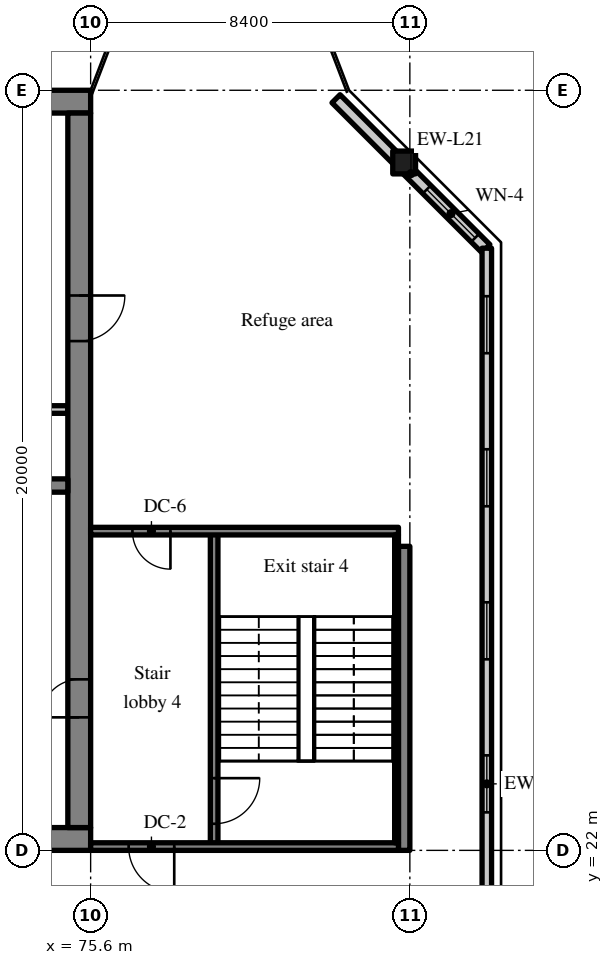
"""IFC4 building model, lengths in metres.
Left out: names, types, materials, properties, quantities, classifications, styles, units other than length and angle.
Written with IfcOpenShell. Run it as: python <this file> out.ifc"""

import sys

from ifc_helpers import new_model, si_unit, direction, frame, frame_2d, origin, origin_2d, place, context, subcontext, project, spatial, rectangle, extrude, source, transform, mapped, element, fill, save


model = new_model("IFC4")
c1 = context("Model", 3, precision=1e-05, world=origin(), true_north=direction((0.0, 1.0)))
c2 = subcontext(c1, "Body", "Model", "MODEL_VIEW")
j1 = project(units=[si_unit("LENGTHUNIT", "METRE"), si_unit("PLANEANGLEUNIT", "RADIAN")], contexts=[c1])
p1 = place(None, origin())
s1 = spatial("IfcSite", under=j1, at=p1, CompositionType="ELEMENT")
p2 = place(p1, origin())
s2 = spatial("IfcBuilding", under=s1, at=p2, CompositionType="ELEMENT")
p3 = place(p2, frame((0.0, 0.0, 237.4)))
s3 = spatial("IfcBuildingStorey", under=s2, at=p3, CompositionType="ELEMENT", Elevation=237.4)
m1 = source(origin(), c2, "Body", "SweptSolid", [
    extrude(rectangle(XDim=50.4, YDim=0.6, at=frame_2d((25.2, 0.0))), origin(), (0.0, 0.0, 1.0), 3.62),
])
p4 = place(p3, frame((25.2, 22.3, 0.0), z_axis=(0.0, 0.0, 1.0), x_axis=(1.0, 0.0, 0.0)))
e1 = element("IfcWall", 1, at=p4, inside=s3, PredefinedType="SHEAR", context=c2, shape_type="MappedRepresentation", body=[
    mapped(m1, transform((0.0, 0.0, 0.0), scale=1.0)),
])
m2 = source(origin(), c2, "Body", "SweptSolid", [
    extrude(rectangle(XDim=1.8, YDim=2.1, at=frame_2d((0.9, 1.05))), frame((0.0, 0.31, 0.0), z_axis=(0.0, -1.0, 0.0), x_axis=(1.0, 0.0, 0.0)), (0.0, 0.0, 1.0), 0.62),
])
p5 = place(p4, frame((15.9, 0.0, 0.0)))
e2 = element("IfcOpeningElement", 2, at=p5, cuts=e1, PredefinedType="OPENING", context=c2, shape_type="MappedRepresentation", body=[
    mapped(m2, transform((0.0, 0.0, 0.0), scale=1.0)),
])
m3 = source(origin(), c2, "Body", "SweptSolid", [
    extrude(rectangle(XDim=0.9, YDim=2.1, at=frame_2d((0.45, 1.05))), frame((0.0, 0.31, 0.0), z_axis=(0.0, -1.0, 0.0), x_axis=(1.0, 0.0, 0.0)), (0.0, 0.0, 1.0), 0.62),
])
p6 = place(p4, frame((9.687, 0.0, 0.0)))
e3 = element("IfcOpeningElement", 3, at=p6, cuts=e1, PredefinedType="OPENING", context=c2, shape_type="MappedRepresentation", body=[
    mapped(m3, transform((0.0, 0.0, 0.0), scale=1.0)),
])
p7 = place(p4, frame((21.513, 0.0, 0.0)))
e4 = element("IfcOpeningElement", 4, at=p7, cuts=e1, PredefinedType="OPENING", context=c2, shape_type="MappedRepresentation", body=[
    mapped(m3, transform((0.0, 0.0, 0.0), scale=1.0)),
])
p8 = place(p4, frame((32.7, 0.0, 0.0)))
e5 = element("IfcOpeningElement", 5, at=p8, cuts=e1, PredefinedType="OPENING", context=c2, shape_type="MappedRepresentation", body=[
    mapped(m2, transform((0.0, 0.0, 0.0), scale=1.0)),
])
m4 = source(origin(), c2, "Body", "SweptSolid", [
    extrude(rectangle(XDim=1.2, YDim=2.1, at=frame_2d((0.6, 1.05))), frame((0.0, 0.31, 0.0), z_axis=(0.0, -1.0, 0.0), x_axis=(1.0, 0.0, 0.0)), (0.0, 0.0, 1.0), 0.62),
])
p9 = place(p4, frame((6.488, 0.0, 0.0)))
e6 = element("IfcOpeningElement", 6, at=p9, cuts=e1, PredefinedType="OPENING", context=c2, shape_type="MappedRepresentation", body=[
    mapped(m4, transform((0.0, 0.0, 0.0), scale=1.0)),
])
p10 = place(p4, frame((47.925, 0.0, 0.0)))
e7 = element("IfcOpeningElement", 7, at=p10, cuts=e1, PredefinedType="OPENING", context=c2, shape_type="MappedRepresentation", body=[
    mapped(m4, transform((0.0, 0.0, 0.0), scale=1.0)),
])
p11 = place(p3, frame((25.2, 41.7, 0.0), z_axis=(0.0, 0.0, 1.0), x_axis=(1.0, 0.0, 0.0)))
e8 = element("IfcWall", 8, at=p11, inside=s3, PredefinedType="SHEAR", context=c2, shape_type="MappedRepresentation", body=[
    mapped(m1, transform((0.0, 0.0, 0.0), scale=1.0)),
])
m5 = source(origin(), c2, "Body", "SweptSolid", [
    extrude(rectangle(XDim=18.8, YDim=0.6, at=frame_2d((9.4, 0.0))), origin(), (0.0, 0.0, 1.0), 3.62),
])
p12 = place(p3, frame((75.3, 22.6, 0.0), z_axis=(0.0, 0.0, 1.0), x_axis=(0.0, 1.0, 0.0)))
e9 = element("IfcWall", 9, at=p12, inside=s3, PredefinedType="SHEAR", context=c2, shape_type="MappedRepresentation", body=[
    mapped(m5, transform((0.0, 0.0, 0.0), scale=1.0)),
])
m6 = source(origin(), c2, "Body", "SweptSolid", [
    extrude(rectangle(XDim=1.0, YDim=2.1, at=frame_2d((0.5, 1.05))), frame((0.0, 0.31, 0.0), z_axis=(0.0, -1.0, 0.0), x_axis=(1.0, 0.0, 0.0)), (0.0, 0.0, 1.0), 0.62),
])
p13 = place(p12, frame((2.9, 0.0, 0.0)))
e10 = element("IfcOpeningElement", 10, at=p13, cuts=e9, PredefinedType="OPENING", context=c2, shape_type="MappedRepresentation", body=[
    mapped(m6, transform((0.0, 0.0, 0.0), scale=1.0)),
])
p14 = place(p12, frame((12.8, 0.0, 0.0)))
e11 = element("IfcOpeningElement", 11, at=p14, cuts=e9, PredefinedType="OPENING", context=c2, shape_type="MappedRepresentation", body=[
    mapped(m4, transform((0.0, 0.0, 0.0), scale=1.0)),
])
m7 = source(origin(), c2, "Body", "SweptSolid", [
    extrude(rectangle(XDim=7.625, YDim=0.35, at=frame_2d((3.812, 0.0))), origin(), (0.0, 0.0, 1.0), 3.62),
])
p15 = place(p3, frame((67.375, 31.6, 0.0), z_axis=(0.0, 0.0, 1.0), x_axis=(1.0, 0.0, 0.0)))
e12 = element("IfcWall", 12, at=p15, inside=s3, PredefinedType="SHEAR", context=c2, shape_type="MappedRepresentation", body=[
    mapped(m7, transform((0.0, 0.0, 0.0), scale=1.0)),
])
m8 = source(origin(), c2, "Body", "SweptSolid", [
    extrude(rectangle(XDim=1.1, YDim=2.1, at=frame_2d((0.55, 1.05))), frame((0.0, 0.185, 0.0), z_axis=(0.0, -1.0, 0.0), x_axis=(1.0, 0.0, 0.0)), (0.0, 0.0, 1.0), 0.37),
])
p16 = place(p15, frame((5.8, 0.0, 0.0)))
e13 = element("IfcOpeningElement", 13, at=p16, cuts=e12, PredefinedType="OPENING", context=c2, shape_type="MappedRepresentation", body=[
    mapped(m8, transform((0.0, 0.0, 0.0), scale=1.0)),
])
m9 = source(origin(), c2, "Body", "SweptSolid", [
    extrude(rectangle(XDim=8.0, YDim=0.3, at=frame_2d((4.0, 0.0))), origin(), (0.0, 0.0, 1.0), 3.62),
])
p17 = place(p3, frame((83.85, 22.0, 0.0), z_axis=(0.0, 0.0, 1.0), x_axis=(0.0, 1.0, 0.0)))
e14 = element("IfcWall", 14, at=p17, inside=s3, PredefinedType="SHEAR", context=c2, shape_type="MappedRepresentation", body=[
    mapped(m9, transform((0.0, 0.0, 0.0), scale=1.0)),
])
m10 = source(origin(), c2, "Body", "SweptSolid", [
    extrude(rectangle(XDim=0.6, YDim=0.6, at=origin_2d()), origin(), (0.0, 0.0, 1.0), 3.62),
])
p18 = place(p3, frame((83.85, 40.1, 0.0), z_axis=(0.0, 0.0, 1.0), x_axis=(1.0, 0.0, 0.0)))
e15 = element("IfcColumn", 15, at=p18, inside=s3, PredefinedType="COLUMN", context=c2, shape_type="MappedRepresentation", body=[
    mapped(m10, transform((0.0, 0.0, 0.0), scale=1.0)),
])
m11 = source(origin(), c2, "Body", "SweptSolid", [
    extrude(rectangle(XDim=5.576, YDim=0.3, at=frame_2d((2.788, 0.0))), origin(), (0.0, 0.0, 1.0), 3.62),
])
p19 = place(p3, frame((86.0, 37.834, 0.0), z_axis=(0.0, 0.0, 1.0), x_axis=(-0.707106781187, 0.707106781187, 0.0)))
e16 = element("IfcWall", 16, at=p19, inside=s3, PredefinedType="SOLIDWALL", context=c2, shape_type="MappedRepresentation", body=[
    mapped(m11, transform((0.0, 0.0, 0.0), scale=1.0)),
])
m12 = source(origin(), c2, "Body", "SweptSolid", [
    extrude(rectangle(XDim=1.8, YDim=1.5, at=frame_2d((0.9, 0.75))), frame((0.0, 0.16, 0.0), z_axis=(0.0, -1.0, 0.0), x_axis=(1.0, 0.0, 0.0)), (0.0, 0.0, 1.0), 0.32),
])
p20 = place(p19, frame((0.399, 0.0, 0.9)))
e17 = element("IfcOpeningElement", 17, at=p20, cuts=e16, PredefinedType="OPENING", context=c2, shape_type="MappedRepresentation", body=[
    mapped(m12, transform((0.0, 0.0, 0.0), scale=1.0)),
])
m13 = source(origin(), c2, "Body", "SweptSolid", [
    extrude(rectangle(XDim=28.189, YDim=0.25, at=frame_2d((14.095, 0.0))), origin(), (0.0, 0.0, 1.0), 3.62),
])
p21 = place(p3, frame((86.025, 9.655, 0.0), z_axis=(0.0, 0.0, 1.0), x_axis=(0.0, 1.0, 0.0)))
e18 = element("IfcWall", 18, at=p21, inside=s3, PredefinedType="SOLIDWALL", context=c2, shape_type="MappedRepresentation", body=[
    mapped(m13, transform((0.0, 0.0, 0.0), scale=1.0)),
])
m14 = source(origin(), c2, "Body", "SweptSolid", [
    extrude(rectangle(XDim=1.5, YDim=1.5, at=frame_2d((0.75, 0.75))), frame((0.0, 0.135, 0.0), z_axis=(0.0, -1.0, 0.0), x_axis=(1.0, 0.0, 0.0)), (0.0, 0.0, 1.0), 0.27),
])
p22 = place(p21, frame((1.263, 0.0, 0.9)))
e19 = element("IfcOpeningElement", 19, at=p22, cuts=e18, PredefinedType="OPENING", context=c2, shape_type="MappedRepresentation", body=[
    mapped(m14, transform((0.0, 0.0, 0.0), scale=1.0)),
])
p23 = place(p21, frame((5.291, 0.0, 0.9)))
e20 = element("IfcOpeningElement", 20, at=p23, cuts=e18, PredefinedType="OPENING", context=c2, shape_type="MappedRepresentation", body=[
    mapped(m14, transform((0.0, 0.0, 0.0), scale=1.0)),
])
p24 = place(p21, frame((9.318, 0.0, 0.9)))
e21 = element("IfcOpeningElement", 21, at=p24, cuts=e18, PredefinedType="OPENING", context=c2, shape_type="MappedRepresentation", body=[
    mapped(m14, transform((0.0, 0.0, 0.0), scale=1.0)),
])
p25 = place(p21, frame((13.345, 0.0, 0.9)))
e22 = element("IfcOpeningElement", 22, at=p25, cuts=e18, PredefinedType="OPENING", context=c2, shape_type="MappedRepresentation", body=[
    mapped(m14, transform((0.0, 0.0, 0.0), scale=1.0)),
])
p26 = place(p21, frame((17.372, 0.0, 0.9)))
e23 = element("IfcOpeningElement", 23, at=p26, cuts=e18, PredefinedType="OPENING", context=c2, shape_type="MappedRepresentation", body=[
    mapped(m14, transform((0.0, 0.0, 0.0), scale=1.0)),
])
p27 = place(p21, frame((21.399, 0.0, 0.9)))
e24 = element("IfcOpeningElement", 24, at=p27, cuts=e18, PredefinedType="OPENING", context=c2, shape_type="MappedRepresentation", body=[
    mapped(m14, transform((0.0, 0.0, 0.0), scale=1.0)),
])
p28 = place(p21, frame((25.426, 0.0, 0.9)))
e25 = element("IfcOpeningElement", 25, at=p28, cuts=e18, PredefinedType="OPENING", context=c2, shape_type="MappedRepresentation", body=[
    mapped(m14, transform((0.0, 0.0, 0.0), scale=1.0)),
])
m15 = source(origin(), c2, "Body", "SweptSolid", [
    extrude(rectangle(XDim=2.55, YDim=0.2, at=frame_2d((1.275, 0.0))), origin(), (0.0, 0.0, 1.0), 3.62),
])
p29 = place(p3, frame((72.45, 33.6, 0.0), z_axis=(0.0, 0.0, 1.0), x_axis=(1.0, 0.0, 0.0)))
e26 = element("IfcWall", 26, at=p29, inside=s3, PredefinedType="SOLIDWALL", context=c2, shape_type="MappedRepresentation", body=[
    mapped(m15, transform((0.0, 0.0, 0.0), scale=1.0)),
])
m16 = source(origin(), c2, "Body", "SweptSolid", [
    extrude(rectangle(XDim=8.3, YDim=0.2, at=frame_2d((4.15, 0.0))), origin(), (0.0, 0.0, 1.0), 3.62),
])
p30 = place(p3, frame((78.85, 22.1, 0.0), z_axis=(0.0, 0.0, 1.0), x_axis=(0.0, 1.0, 0.0)))
e27 = element("IfcWall", 27, at=p30, inside=s3, PredefinedType="SOLIDWALL", context=c2, shape_type="MappedRepresentation", body=[
    mapped(m16, transform((0.0, 0.0, 0.0), scale=1.0)),
])
m17 = source(origin(), c2, "Body", "SweptSolid", [
    extrude(rectangle(XDim=1.2, YDim=2.1, at=frame_2d((0.6, 1.05))), frame((0.0, 0.11, 0.0), z_axis=(0.0, -1.0, 0.0), x_axis=(1.0, 0.0, 0.0)), (0.0, 0.0, 1.0), 0.22),
])
p31 = place(p30, frame((0.6, 0.0, 0.0)))
e28 = element("IfcOpeningElement", 28, at=p31, cuts=e27, PredefinedType="OPENING", context=c2, shape_type="MappedRepresentation", body=[
    mapped(m17, transform((0.0, 0.0, 0.0), scale=1.0)),
])
m18 = source(origin(), c2, "Body", "SweptSolid", [
    extrude(rectangle(XDim=8.1, YDim=0.2, at=frame_2d((4.05, 0.0))), origin(), (0.0, 0.0, 1.0), 3.62),
])
p32 = place(p3, frame((83.7, 22.1, 0.0), z_axis=(0.0, 0.0, 1.0), x_axis=(-1.0, 0.0, 0.0)))
e29 = element("IfcWall", 29, at=p32, inside=s3, PredefinedType="SOLIDWALL", context=c2, shape_type="MappedRepresentation", body=[
    mapped(m18, transform((0.0, 0.0, 0.0), scale=1.0)),
])
p33 = place(p32, frame((5.9, 0.0, 0.0)))
e30 = element("IfcOpeningElement", 30, at=p33, cuts=e29, PredefinedType="OPENING", context=c2, shape_type="MappedRepresentation", body=[
    mapped(m17, transform((0.0, 0.0, 0.0), scale=1.0)),
])
p34 = place(p3, frame((83.7, 30.4, 0.0), z_axis=(0.0, 0.0, 1.0), x_axis=(-1.0, 0.0, 0.0)))
e31 = element("IfcWall", 31, at=p34, inside=s3, PredefinedType="SOLIDWALL", context=c2, shape_type="MappedRepresentation", body=[
    mapped(m18, transform((0.0, 0.0, 0.0), scale=1.0)),
])
m19 = source(origin(), c2, "Body", "SweptSolid", [
    extrude(rectangle(XDim=1.0, YDim=2.1, at=frame_2d((0.5, 1.05))), frame((0.0, 0.11, 0.0), z_axis=(0.0, -1.0, 0.0), x_axis=(1.0, 0.0, 0.0)), (0.0, 0.0, 1.0), 0.22),
])
p35 = place(p34, frame((6.0, 0.0, 0.0)))
e32 = element("IfcOpeningElement", 32, at=p35, cuts=e31, PredefinedType="OPENING", context=c2, shape_type="MappedRepresentation", body=[
    mapped(m19, transform((0.0, 0.0, 0.0), scale=1.0)),
])
m20 = source(origin(), c2, "Body", "SweptSolid", [
    extrude(rectangle(XDim=8.1, YDim=0.1, at=frame_2d((4.05, 0.0))), origin(), (0.0, 0.0, 1.0), 3.62),
])
p36 = place(p3, frame((83.65, 22.2, 0.0), z_axis=(0.0, 0.0, 1.0), x_axis=(0.0, 1.0, 0.0)))
e33 = element("IfcWall", 33, at=p36, inside=s3, PredefinedType="SOLIDWALL", context=c2, shape_type="MappedRepresentation", body=[
    mapped(m20, transform((0.0, 0.0, 0.0), scale=1.0)),
])
m21 = source(origin(), c2, "Body", "SweptSolid", [
    extrude(rectangle(XDim=1.8, YDim=1.5, at=frame_2d((0.9, 0.75))), frame((0.0, 0.03, 0.0), z_axis=(0.0, -1.0, 0.0), x_axis=(1.0, 0.0, 0.0)), (0.0, 0.0, 1.0), 0.06),
])
p37 = place(p20, origin())
e34 = element("IfcWindow", 34, at=p37, inside=s3, PartitioningType="SINGLE_PANEL", PredefinedType="WINDOW", context=c2, shape_type="MappedRepresentation", body=[
    mapped(m21, transform((0.0, 0.0, 0.0), scale=1.0)),
])
fill(e17, e34)
m22 = source(origin(), c2, "Body", "SweptSolid", [
    extrude(rectangle(XDim=1.5, YDim=1.5, at=frame_2d((0.75, 0.75))), frame((0.0, 0.03, 0.0), z_axis=(0.0, -1.0, 0.0), x_axis=(1.0, 0.0, 0.0)), (0.0, 0.0, 1.0), 0.06),
])
p38 = place(p25, origin())
e35 = element("IfcWindow", 35, at=p38, inside=s3, PartitioningType="SINGLE_PANEL", PredefinedType="WINDOW", context=c2, shape_type="MappedRepresentation", body=[
    mapped(m22, transform((0.0, 0.0, 0.0), scale=1.0)),
])
fill(e22, e35)
p39 = place(p26, origin())
e36 = element("IfcWindow", 36, at=p39, inside=s3, PartitioningType="SINGLE_PANEL", PredefinedType="WINDOW", context=c2, shape_type="MappedRepresentation", body=[
    mapped(m22, transform((0.0, 0.0, 0.0), scale=1.0)),
])
fill(e23, e36)
p40 = place(p27, origin())
e37 = element("IfcWindow", 37, at=p40, inside=s3, PartitioningType="SINGLE_PANEL", PredefinedType="WINDOW", context=c2, shape_type="MappedRepresentation", body=[
    mapped(m22, transform((0.0, 0.0, 0.0), scale=1.0)),
])
fill(e24, e37)
p41 = place(p28, origin())
e38 = element("IfcWindow", 38, at=p41, inside=s3, PartitioningType="SINGLE_PANEL", PredefinedType="WINDOW", context=c2, shape_type="MappedRepresentation", body=[
    mapped(m22, transform((0.0, 0.0, 0.0), scale=1.0)),
])
fill(e25, e38)
m23 = source(origin(), c2, "Body", "SweptSolid", [
    extrude(rectangle(XDim=1.0, YDim=2.1, at=frame_2d((0.5, 1.05))), frame((0.0, 0.025, 0.0), z_axis=(0.0, -1.0, 0.0), x_axis=(1.0, 0.0, 0.0)), (0.0, 0.0, 1.0), 0.05),
])
p42 = place(p13, origin())
e39 = element("IfcDoor", 39, at=p42, inside=s3, OperationType="SINGLE_SWING_LEFT", PredefinedType="DOOR", context=c2, shape_type="MappedRepresentation", body=[
    mapped(m23, transform((0.0, 0.0, 0.0), scale=1.0)),
])
fill(e10, e39)
m24 = source(origin(), c2, "Body", "SweptSolid", [
    extrude(rectangle(XDim=1.2, YDim=2.1, at=frame_2d((0.6, 1.05))), frame((0.0, 0.025, 0.0), z_axis=(0.0, -1.0, 0.0), x_axis=(1.0, 0.0, 0.0)), (0.0, 0.0, 1.0), 0.05),
])
p43 = place(p14, origin())
e40 = element("IfcDoor", 40, at=p43, inside=s3, OperationType="SINGLE_SWING_RIGHT", PredefinedType="DOOR", context=c2, shape_type="MappedRepresentation", body=[
    mapped(m24, transform((0.0, 0.0, 0.0), scale=1.0)),
])
fill(e11, e40)
p44 = place(p31, origin())
e41 = element("IfcDoor", 41, at=p44, inside=s3, OperationType="SINGLE_SWING_RIGHT", PredefinedType="DOOR", context=c2, shape_type="MappedRepresentation", body=[
    mapped(m24, transform((0.0, 0.0, 0.0), scale=1.0)),
])
fill(e28, e41)
p45 = place(p33, origin())
e42 = element("IfcDoor", 42, at=p45, inside=s3, OperationType="SINGLE_SWING_LEFT", PredefinedType="DOOR", context=c2, shape_type="MappedRepresentation", body=[
    mapped(m24, transform((0.0, 0.0, 0.0), scale=1.0)),
])
fill(e30, e42)
p46 = place(p35, origin())
e43 = element("IfcDoor", 43, at=p46, inside=s3, OperationType="SINGLE_SWING_LEFT", PredefinedType="DOOR", context=c2, shape_type="MappedRepresentation", body=[
    mapped(m23, transform((0.0, 0.0, 0.0), scale=1.0)),
])
fill(e32, e43)
save(model, sys.argv[1])
